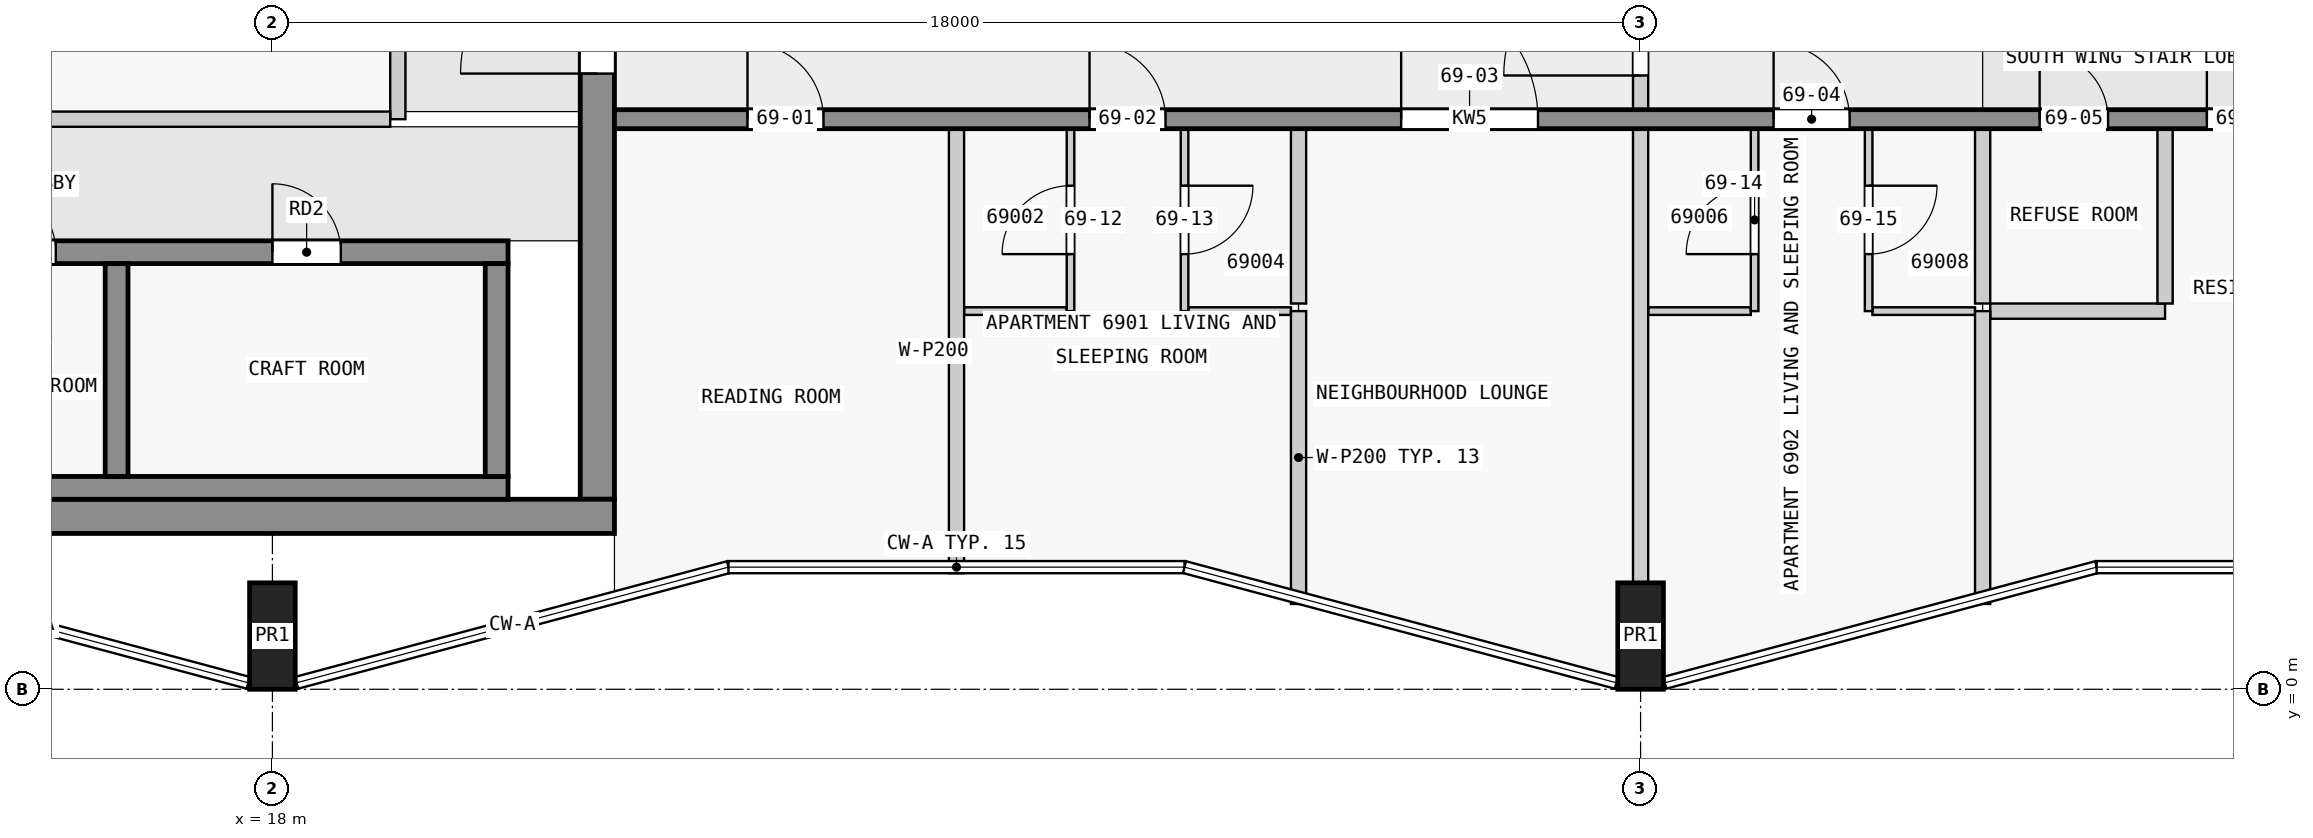
"""IFC4 building model, lengths in metres.
Left out: names, types, materials, properties, quantities, classifications, styles, units other than length and angle.
Written with IfcOpenShell. Run it as: python <this file> out.ifc"""

import sys

from ifc_helpers import new_model, si_unit, direction, frame, frame_2d, origin, origin_2d, place, context, subcontext, project, spatial, rectangle, extrude, element, fill, save


model = new_model("IFC4")
c1 = context("Model", 3, precision=1e-05, world=origin(), true_north=direction((0.0, 1.0)))
c2 = subcontext(c1, "Body", "Model", "MODEL_VIEW")
j1 = project(units=[si_unit("LENGTHUNIT", "METRE"), si_unit("PLANEANGLEUNIT", "RADIAN")], contexts=[c1])
p1 = place(None, origin())
s1 = spatial("IfcSite", under=j1, at=p1, CompositionType="ELEMENT")
p2 = place(p1, origin())
s2 = spatial("IfcBuilding", under=s1, at=p2, CompositionType="ELEMENT")
p3 = place(p2, frame((0.0, 0.0, 263.4)))
s3 = spatial("IfcBuildingStorey", under=s2, at=p3, CompositionType="ELEMENT", Elevation=263.4)
for number, where, z_axis, x_axis in (
    (1, (18.0, 0.7, 0.0), (0.0, 0.0, 1.0), (1.0, 0.0, 0.0)),
    (2, (36.0, 0.7, 0.0), (0.0, 0.0, 1.0), (1.0, 0.0, 0.0)),
):
    element("IfcColumn", number, at=place(p3, frame(where, z_axis=z_axis, x_axis=x_axis)), inside=s3, PredefinedType="COLUMN", context=c2, shape_type="SweptSolid", body=[
        extrude(rectangle(XDim=0.6, YDim=1.4, at=origin_2d()), origin(), (0.0, 0.0, 1.0), 3.5),
    ])
p4 = place(p3, frame((1.85, 2.275, 0.0), z_axis=(0.0, 0.0, 1.0), x_axis=(1.0, 0.0, 0.0)))
e3 = element("IfcWall", 3, at=p4, inside=s3, PredefinedType="SHEAR", context=c2, shape_type="SweptSolid", body=[
    extrude(rectangle(XDim=20.65, YDim=0.45, at=frame_2d((10.325, 0.0))), origin(), (0.0, 0.0, 1.0), 3.25),
])
p5 = place(p3, frame((22.275, 2.5, 0.0), z_axis=(0.0, 0.0, 1.0), x_axis=(0.0, 1.0, 0.0)))
e4 = element("IfcWall", 4, at=p5, inside=s3, PredefinedType="SHEAR", context=c2, shape_type="SweptSolid", body=[
    extrude(rectangle(XDim=15.05, YDim=0.45, at=frame_2d((7.525, 0.0))), origin(), (0.0, 0.0, 1.0), 3.25),
])
p6 = place(p5, frame((5.6, 0.0, 0.0)))
e5 = element("IfcOpeningElement", 5, at=p6, cuts=e4, PredefinedType="OPENING", context=c2, shape_type="SweptSolid", body=[
    extrude(rectangle(XDim=1.8, YDim=2.1, at=frame_2d((0.9, 1.05))), frame((0.0, 0.235, 0.0), z_axis=(0.0, -1.0, 0.0), x_axis=(1.0, 0.0, 0.0)), (0.0, 0.0, 1.0), 0.47),
])
p7 = place(p3, frame((13.3, 2.65, 0.0), z_axis=(0.0, 0.0, 1.0), x_axis=(1.0, 0.0, 0.0)))
e6 = element("IfcWall", 6, at=p7, inside=s3, PredefinedType="SHEAR", context=c2, shape_type="SweptSolid", body=[
    extrude(rectangle(XDim=7.8, YDim=0.3, at=frame_2d((3.9, 0.0))), origin(), (0.0, 0.0, 1.0), 3.25),
])
for number, where, z_axis, x_axis in (
    (7, (15.95, 2.8, 0.0), (0.0, 0.0, 1.0), (0.0, 1.0, 0.0)),
    (8, (20.95, 2.8, 0.0), (0.0, 0.0, 1.0), (0.0, 1.0, 0.0)),
):
    element("IfcWall", number, at=place(p3, frame(where, z_axis=z_axis, x_axis=x_axis)), inside=s3, PredefinedType="SHEAR", context=c2, shape_type="SweptSolid", body=[
        extrude(rectangle(XDim=2.8, YDim=0.3, at=frame_2d((1.4, 0.0))), origin(), (0.0, 0.0, 1.0), 3.25),
    ])
p8 = place(p3, frame((2.3, 5.75, 0.0), z_axis=(0.0, 0.0, 1.0), x_axis=(1.0, 0.0, 0.0)))
e9 = element("IfcWall", 9, at=p8, inside=s3, PredefinedType="SHEAR", context=c2, shape_type="SweptSolid", body=[
    extrude(rectangle(XDim=18.8, YDim=0.3, at=frame_2d((9.4, 0.0))), origin(), (0.0, 0.0, 1.0), 3.25),
])
p9 = place(p8, frame((4.65, 0.0, 0.0)))
e10 = element("IfcOpeningElement", 10, at=p9, cuts=e9, PredefinedType="OPENING", context=c2, shape_type="SweptSolid", body=[
    extrude(rectangle(XDim=1.1, YDim=2.1, at=frame_2d((0.55, 1.05))), frame((0.0, 0.16, 0.0), z_axis=(0.0, -1.0, 0.0), x_axis=(1.0, 0.0, 0.0)), (0.0, 0.0, 1.0), 0.32),
])
p10 = place(p8, frame((0.45, 0.0, 0.0)))
e11 = element("IfcOpeningElement", 11, at=p10, cuts=e9, PredefinedType="OPENING", context=c2, shape_type="SweptSolid", body=[
    extrude(rectangle(XDim=1.1, YDim=2.1, at=frame_2d((0.55, 1.05))), frame((0.0, 0.16, 0.0), z_axis=(0.0, -1.0, 0.0), x_axis=(1.0, 0.0, 0.0)), (0.0, 0.0, 1.0), 0.32),
])
p11 = place(p8, frame((2.75, 0.0, 0.0)))
e12 = element("IfcOpeningElement", 12, at=p11, cuts=e9, PredefinedType="OPENING", context=c2, shape_type="SweptSolid", body=[
    extrude(rectangle(XDim=1.1, YDim=2.1, at=frame_2d((0.55, 1.05))), frame((0.0, 0.16, 0.0), z_axis=(0.0, -1.0, 0.0), x_axis=(1.0, 0.0, 0.0)), (0.0, 0.0, 1.0), 0.32),
])
p12 = place(p8, frame((11.95, 0.0, 0.0)))
e13 = element("IfcOpeningElement", 13, at=p12, cuts=e9, PredefinedType="OPENING", context=c2, shape_type="SweptSolid", body=[
    extrude(rectangle(XDim=0.9, YDim=2.1, at=frame_2d((0.45, 1.05))), frame((0.0, 0.16, 0.0), z_axis=(0.0, -1.0, 0.0), x_axis=(1.0, 0.0, 0.0)), (0.0, 0.0, 1.0), 0.32),
])
p13 = place(p8, frame((15.7, 0.0, 0.0)))
e14 = element("IfcOpeningElement", 14, at=p13, cuts=e9, PredefinedType="OPENING", context=c2, shape_type="SweptSolid", body=[
    extrude(rectangle(XDim=0.9, YDim=2.1, at=frame_2d((0.45, 1.05))), frame((0.0, 0.16, 0.0), z_axis=(0.0, -1.0, 0.0), x_axis=(1.0, 0.0, 0.0)), (0.0, 0.0, 1.0), 0.32),
])
p14 = place(p3, frame((22.5, 7.5, 0.0), z_axis=(0.0, 0.0, 1.0), x_axis=(1.0, 0.0, 0.0)))
e15 = element("IfcWall", 15, at=p14, inside=s3, PredefinedType="SHEAR", context=c2, shape_type="SweptSolid", body=[
    extrude(rectangle(XDim=22.5, YDim=0.25, at=frame_2d((11.25, 0.0))), origin(), (0.0, 0.0, 1.0), 3.25),
])
p15 = place(p14, frame((1.75, 0.0, 0.0)))
e16 = element("IfcOpeningElement", 16, at=p15, cuts=e15, PredefinedType="OPENING", context=c2, shape_type="SweptSolid", body=[
    extrude(rectangle(XDim=1.0, YDim=2.1, at=frame_2d((0.5, 1.05))), frame((0.0, 0.135, 0.0), z_axis=(0.0, -1.0, 0.0), x_axis=(1.0, 0.0, 0.0)), (0.0, 0.0, 1.0), 0.27),
])
p16 = place(p14, frame((6.25, 0.0, 0.0)))
e17 = element("IfcOpeningElement", 17, at=p16, cuts=e15, PredefinedType="OPENING", context=c2, shape_type="SweptSolid", body=[
    extrude(rectangle(XDim=1.0, YDim=2.1, at=frame_2d((0.5, 1.05))), frame((0.0, 0.135, 0.0), z_axis=(0.0, -1.0, 0.0), x_axis=(1.0, 0.0, 0.0)), (0.0, 0.0, 1.0), 0.27),
])
p17 = place(p14, frame((10.35, 0.0, 0.0)))
e18 = element("IfcOpeningElement", 18, at=p17, cuts=e15, PredefinedType="OPENING", context=c2, shape_type="SweptSolid", body=[
    extrude(rectangle(XDim=1.8, YDim=2.1, at=frame_2d((0.9, 1.05))), frame((0.0, 0.135, 0.0), z_axis=(0.0, -1.0, 0.0), x_axis=(1.0, 0.0, 0.0)), (0.0, 0.0, 1.0), 0.27),
])
p18 = place(p14, frame((15.25, 0.0, 0.0)))
e19 = element("IfcOpeningElement", 19, at=p18, cuts=e15, PredefinedType="OPENING", context=c2, shape_type="SweptSolid", body=[
    extrude(rectangle(XDim=1.0, YDim=2.1, at=frame_2d((0.5, 1.05))), frame((0.0, 0.135, 0.0), z_axis=(0.0, -1.0, 0.0), x_axis=(1.0, 0.0, 0.0)), (0.0, 0.0, 1.0), 0.27),
])
p19 = place(p14, frame((18.75, 0.0, 0.0)))
e20 = element("IfcOpeningElement", 20, at=p19, cuts=e15, PredefinedType="OPENING", context=c2, shape_type="SweptSolid", body=[
    extrude(rectangle(XDim=0.9, YDim=2.1, at=frame_2d((0.45, 1.05))), frame((0.0, 0.135, 0.0), z_axis=(0.0, -1.0, 0.0), x_axis=(1.0, 0.0, 0.0)), (0.0, 0.0, 1.0), 0.27),
])
p20 = place(p14, frame((20.95, 0.0, 0.0)))
e21 = element("IfcOpeningElement", 21, at=p20, cuts=e15, PredefinedType="OPENING", context=c2, shape_type="SweptSolid", body=[
    extrude(rectangle(XDim=1.0, YDim=2.1, at=frame_2d((0.5, 1.05))), frame((0.0, 0.135, 0.0), z_axis=(0.0, -1.0, 0.0), x_axis=(1.0, 0.0, 0.0)), (0.0, 0.0, 1.0), 0.27),
])
p21 = place(p3, frame((10.9, 7.5, 0.0), z_axis=(0.0, 0.0, 1.0), x_axis=(1.0, 0.0, 0.0)))
e22 = element("IfcWall", 22, at=p21, inside=s3, PredefinedType="PARTITIONING", context=c2, shape_type="SweptSolid", body=[
    extrude(rectangle(XDim=8.65, YDim=0.2, at=frame_2d((4.325, 0.0))), origin(), (0.0, 0.0, 1.0), 3.25),
])
p22 = place(p3, frame((19.65, 7.5, 0.0), z_axis=(0.0, 0.0, 1.0), x_axis=(0.0, 1.0, 0.0)))
e23 = element("IfcWall", 23, at=p22, inside=s3, PredefinedType="PARTITIONING", context=c2, shape_type="SweptSolid", body=[
    extrude(rectangle(XDim=4.7, YDim=0.2, at=frame_2d((2.35, 0.0))), origin(), (0.0, 0.0, 1.0), 3.25),
])
for number, where, z_axis, x_axis in (
    (24, (27.1, 4.975, 0.0), (0.0, 0.0, 1.0), (1.0, 0.0, 0.0)),
    (25, (30.05, 4.975, 0.0), (0.0, 0.0, 1.0), (1.0, 0.0, 0.0)),
    (26, (36.1, 4.975, 0.0), (0.0, 0.0, 1.0), (1.0, 0.0, 0.0)),
    (27, (39.05, 4.975, 0.0), (0.0, 0.0, 1.0), (1.0, 0.0, 0.0)),
):
    element("IfcWall", number, at=place(p3, frame(where, z_axis=z_axis, x_axis=x_axis)), inside=s3, PredefinedType="PARTITIONING", context=c2, shape_type="SweptSolid", body=[
        extrude(rectangle(XDim=1.35, YDim=0.1, at=frame_2d((0.675, 0.0))), origin(), (0.0, 0.0, 1.0), 3.25),
    ])
p23 = place(p3, frame((40.6, 4.975, 0.0), z_axis=(0.0, 0.0, 1.0), x_axis=(1.0, 0.0, 0.0)))
e28 = element("IfcWall", 28, at=p23, inside=s3, PredefinedType="PARTITIONING", context=c2, shape_type="SweptSolid", body=[
    extrude(rectangle(XDim=2.3, YDim=0.2, at=frame_2d((1.15, 0.0))), origin(), (0.0, 0.0, 1.0), 3.25),
])
p24 = place(p3, frame((27.0, 1.527, 0.0), z_axis=(0.0, 0.0, 1.0), x_axis=(0.0, 1.0, 0.0)))
e29 = element("IfcWall", 29, at=p24, inside=s3, PredefinedType="PARTITIONING", context=c2, shape_type="SweptSolid", body=[
    extrude(rectangle(XDim=5.848, YDim=0.2, at=frame_2d((2.924, 0.0))), origin(), (0.0, 0.0, 1.0), 3.25),
])
p25 = place(p3, frame((28.5, 4.975, 0.0), z_axis=(0.0, 0.0, 1.0), x_axis=(0.0, 1.0, 0.0)))
e30 = element("IfcWall", 30, at=p25, inside=s3, PredefinedType="PARTITIONING", context=c2, shape_type="SweptSolid", body=[
    extrude(rectangle(XDim=2.4, YDim=0.1, at=frame_2d((1.2, 0.0))), origin(), (0.0, 0.0, 1.0), 3.25),
])
p26 = place(p25, frame((0.75, 0.0, 0.0)))
e31 = element("IfcOpeningElement", 31, at=p26, cuts=e30, PredefinedType="OPENING", context=c2, shape_type="SweptSolid", body=[
    extrude(rectangle(XDim=0.9, YDim=2.1, at=frame_2d((0.45, 1.05))), frame((0.0, 0.06, 0.0), z_axis=(0.0, -1.0, 0.0), x_axis=(1.0, 0.0, 0.0)), (0.0, 0.0, 1.0), 0.12),
])
p27 = place(p3, frame((30.0, 7.375, 0.0), z_axis=(0.0, 0.0, 1.0), x_axis=(0.0, -1.0, 0.0)))
e32 = element("IfcWall", 32, at=p27, inside=s3, PredefinedType="PARTITIONING", context=c2, shape_type="SweptSolid", body=[
    extrude(rectangle(XDim=2.4, YDim=0.1, at=frame_2d((1.2, 0.0))), origin(), (0.0, 0.0, 1.0), 3.25),
])
p28 = place(p27, frame((0.75, 0.0, 0.0)))
e33 = element("IfcOpeningElement", 33, at=p28, cuts=e32, PredefinedType="OPENING", context=c2, shape_type="SweptSolid", body=[
    extrude(rectangle(XDim=0.9, YDim=2.1, at=frame_2d((0.45, 1.05))), frame((0.0, 0.06, 0.0), z_axis=(0.0, -1.0, 0.0), x_axis=(1.0, 0.0, 0.0)), (0.0, 0.0, 1.0), 0.12),
])
p29 = place(p3, frame((31.5, 4.975, 0.0), z_axis=(0.0, 0.0, 1.0), x_axis=(0.0, -1.0, 0.0)))
e34 = element("IfcWall", 34, at=p29, inside=s3, PredefinedType="PARTITIONING", context=c2, shape_type="SweptSolid", body=[
    extrude(rectangle(XDim=3.853, YDim=0.2, at=frame_2d((1.926, 0.0))), origin(), (0.0, 0.0, 1.0), 3.25),
])
p30 = place(p3, frame((31.5, 5.075, 0.0), z_axis=(0.0, 0.0, 1.0), x_axis=(0.0, 1.0, 0.0)))
e35 = element("IfcWall", 35, at=p30, inside=s3, PredefinedType="PARTITIONING", context=c2, shape_type="SweptSolid", body=[
    extrude(rectangle(XDim=2.3, YDim=0.2, at=frame_2d((1.15, 0.0))), origin(), (0.0, 0.0, 1.0), 3.25),
])
p31 = place(p3, frame((36.0, 1.4, 0.0), z_axis=(0.0, 0.0, 1.0), x_axis=(0.0, 1.0, 0.0)))
e36 = element("IfcWall", 36, at=p31, inside=s3, PredefinedType="PARTITIONING", context=c2, shape_type="SweptSolid", body=[
    extrude(rectangle(XDim=5.975, YDim=0.2, at=frame_2d((2.988, 0.0))), origin(), (0.0, 0.0, 1.0), 3.25),
])
p32 = place(p3, frame((37.5, 4.975, 0.0), z_axis=(0.0, 0.0, 1.0), x_axis=(0.0, 1.0, 0.0)))
e37 = element("IfcWall", 37, at=p32, inside=s3, PredefinedType="PARTITIONING", context=c2, shape_type="SweptSolid", body=[
    extrude(rectangle(XDim=2.4, YDim=0.1, at=frame_2d((1.2, 0.0))), origin(), (0.0, 0.0, 1.0), 3.25),
])
p33 = place(p32, frame((0.75, 0.0, 0.0)))
e38 = element("IfcOpeningElement", 38, at=p33, cuts=e37, PredefinedType="OPENING", context=c2, shape_type="SweptSolid", body=[
    extrude(rectangle(XDim=0.9, YDim=2.1, at=frame_2d((0.45, 1.05))), frame((0.0, 0.06, 0.0), z_axis=(0.0, -1.0, 0.0), x_axis=(1.0, 0.0, 0.0)), (0.0, 0.0, 1.0), 0.12),
])
p34 = place(p3, frame((39.0, 7.375, 0.0), z_axis=(0.0, 0.0, 1.0), x_axis=(0.0, -1.0, 0.0)))
e39 = element("IfcWall", 39, at=p34, inside=s3, PredefinedType="PARTITIONING", context=c2, shape_type="SweptSolid", body=[
    extrude(rectangle(XDim=2.4, YDim=0.1, at=frame_2d((1.2, 0.0))), origin(), (0.0, 0.0, 1.0), 3.25),
])
p35 = place(p34, frame((0.75, 0.0, 0.0)))
e40 = element("IfcOpeningElement", 40, at=p35, cuts=e39, PredefinedType="OPENING", context=c2, shape_type="SweptSolid", body=[
    extrude(rectangle(XDim=0.9, YDim=2.1, at=frame_2d((0.45, 1.05))), frame((0.0, 0.06, 0.0), z_axis=(0.0, -1.0, 0.0), x_axis=(1.0, 0.0, 0.0)), (0.0, 0.0, 1.0), 0.12),
])
p36 = place(p3, frame((40.5, 4.975, 0.0), z_axis=(0.0, 0.0, 1.0), x_axis=(0.0, -1.0, 0.0)))
e41 = element("IfcWall", 41, at=p36, inside=s3, PredefinedType="PARTITIONING", context=c2, shape_type="SweptSolid", body=[
    extrude(rectangle(XDim=3.853, YDim=0.2, at=frame_2d((1.926, 0.0))), origin(), (0.0, 0.0, 1.0), 3.25),
])
for number, where, z_axis, x_axis in (
    (42, (40.5, 5.075, 0.0), (0.0, 0.0, 1.0), (0.0, 1.0, 0.0)),
    (43, (42.9, 5.075, 0.0), (0.0, 0.0, 1.0), (0.0, 1.0, 0.0)),
):
    element("IfcWall", number, at=place(p3, frame(where, z_axis=z_axis, x_axis=x_axis)), inside=s3, PredefinedType="PARTITIONING", context=c2, shape_type="SweptSolid", body=[
        extrude(rectangle(XDim=2.3, YDim=0.2, at=frame_2d((1.15, 0.0))), origin(), (0.0, 0.0, 1.0), 3.25),
    ])
p37 = place(p3, frame((36.0, 7.475, 0.0), z_axis=(0.0, 0.0, 1.0), x_axis=(0.0, 1.0, 0.0)))
e44 = element("IfcWall", 44, at=p37, inside=s3, PredefinedType="PARTITIONING", context=c2, shape_type="SweptSolid", body=[
    extrude(rectangle(XDim=3.05, YDim=0.2, at=frame_2d((1.525, 0.0))), origin(), (0.0, 0.0, 1.0), 3.25),
])
p38 = place(p37, frame((0.6, 0.0, 0.0)))
e45 = element("IfcOpeningElement", 45, at=p38, cuts=e44, PredefinedType="OPENING", context=c2, shape_type="SweptSolid", body=[
    extrude(rectangle(XDim=1.8, YDim=2.1, at=frame_2d((0.9, 1.05))), frame((0.0, 0.11, 0.0), z_axis=(0.0, -1.0, 0.0), x_axis=(1.0, 0.0, 0.0)), (0.0, 0.0, 1.0), 0.22),
])
p39 = place(p6, origin())
e46 = element("IfcDoor", 46, at=p39, inside=s3, OperationType="DOUBLE_DOOR_SINGLE_SWING", PredefinedType="DOOR", context=c2, shape_type="SweptSolid", body=[
    extrude(rectangle(XDim=1.8, YDim=2.1, at=frame_2d((0.9, 1.05))), frame((0.0, 0.025, 0.0), z_axis=(0.0, -1.0, 0.0), x_axis=(1.0, 0.0, 0.0)), (0.0, 0.0, 1.0), 0.05),
])
fill(e5, e46)
p40 = place(p12, origin())
e47 = element("IfcDoor", 47, at=p40, inside=s3, OperationType="SINGLE_SWING_LEFT", PredefinedType="DOOR", context=c2, shape_type="SweptSolid", body=[
    extrude(rectangle(XDim=0.9, YDim=2.1, at=frame_2d((0.45, 1.05))), frame((0.0, 0.025, 0.0), z_axis=(0.0, -1.0, 0.0), x_axis=(1.0, 0.0, 0.0)), (0.0, 0.0, 1.0), 0.05),
])
fill(e13, e47)
p41 = place(p13, origin())
e48 = element("IfcDoor", 48, at=p41, inside=s3, OperationType="SINGLE_SWING_LEFT", PredefinedType="DOOR", context=c2, shape_type="SweptSolid", body=[
    extrude(rectangle(XDim=0.9, YDim=2.1, at=frame_2d((0.45, 1.05))), frame((0.0, 0.025, 0.0), z_axis=(0.0, -1.0, 0.0), x_axis=(1.0, 0.0, 0.0)), (0.0, 0.0, 1.0), 0.05),
])
fill(e14, e48)
p42 = place(p15, origin())
e49 = element("IfcDoor", 49, at=p42, inside=s3, OperationType="SINGLE_SWING_LEFT", PredefinedType="DOOR", context=c2, shape_type="SweptSolid", body=[
    extrude(rectangle(XDim=1.0, YDim=2.1, at=frame_2d((0.5, 1.05))), frame((0.0, 0.025, 0.0), z_axis=(0.0, -1.0, 0.0), x_axis=(1.0, 0.0, 0.0)), (0.0, 0.0, 1.0), 0.05),
])
fill(e16, e49)
p43 = place(p16, origin())
e50 = element("IfcDoor", 50, at=p43, inside=s3, OperationType="SINGLE_SWING_LEFT", PredefinedType="DOOR", context=c2, shape_type="SweptSolid", body=[
    extrude(rectangle(XDim=1.0, YDim=2.1, at=frame_2d((0.5, 1.05))), frame((0.0, 0.025, 0.0), z_axis=(0.0, -1.0, 0.0), x_axis=(1.0, 0.0, 0.0)), (0.0, 0.0, 1.0), 0.05),
])
fill(e17, e50)
p44 = place(p17, origin())
e51 = element("IfcDoor", 51, at=p44, inside=s3, OperationType="SINGLE_SWING_LEFT", PredefinedType="DOOR", context=c2, shape_type="SweptSolid", body=[
    extrude(rectangle(XDim=1.8, YDim=2.1, at=frame_2d((0.9, 1.05))), frame((0.0, 0.025, 0.0), z_axis=(0.0, -1.0, 0.0), x_axis=(1.0, 0.0, 0.0)), (0.0, 0.0, 1.0), 0.05),
])
fill(e18, e51)
p45 = place(p18, origin())
e52 = element("IfcDoor", 52, at=p45, inside=s3, OperationType="SINGLE_SWING_RIGHT", PredefinedType="DOOR", context=c2, shape_type="SweptSolid", body=[
    extrude(rectangle(XDim=1.0, YDim=2.1, at=frame_2d((0.5, 1.05))), frame((0.0, 0.025, 0.0), z_axis=(0.0, -1.0, 0.0), x_axis=(1.0, 0.0, 0.0)), (0.0, 0.0, 1.0), 0.05),
])
fill(e19, e52)
p46 = place(p19, origin())
e53 = element("IfcDoor", 53, at=p46, inside=s3, OperationType="SINGLE_SWING_RIGHT", PredefinedType="DOOR", context=c2, shape_type="SweptSolid", body=[
    extrude(rectangle(XDim=0.9, YDim=2.1, at=frame_2d((0.45, 1.05))), frame((0.0, 0.025, 0.0), z_axis=(0.0, -1.0, 0.0), x_axis=(1.0, 0.0, 0.0)), (0.0, 0.0, 1.0), 0.05),
])
fill(e20, e53)
p47 = place(p20, origin())
e54 = element("IfcDoor", 54, at=p47, inside=s3, OperationType="SINGLE_SWING_RIGHT", PredefinedType="DOOR", context=c2, shape_type="SweptSolid", body=[
    extrude(rectangle(XDim=1.0, YDim=2.1, at=frame_2d((0.5, 1.05))), frame((0.0, 0.025, 0.0), z_axis=(0.0, -1.0, 0.0), x_axis=(1.0, 0.0, 0.0)), (0.0, 0.0, 1.0), 0.05),
])
fill(e21, e54)
p48 = place(p38, origin())
e55 = element("IfcDoor", 55, at=p48, inside=s3, OperationType="SINGLE_SWING_LEFT", PredefinedType="DOOR", context=c2, shape_type="SweptSolid", body=[
    extrude(rectangle(XDim=1.8, YDim=2.1, at=frame_2d((0.9, 1.05))), frame((0.0, 0.025, 0.0), z_axis=(0.0, -1.0, 0.0), x_axis=(1.0, 0.0, 0.0)), (0.0, 0.0, 1.0), 0.05),
])
fill(e45, e55)
p49 = place(p26, origin())
e56 = element("IfcDoor", 56, at=p49, inside=s3, OperationType="SINGLE_SWING_LEFT", PredefinedType="DOOR", context=c2, shape_type="SweptSolid", body=[
    extrude(rectangle(XDim=0.9, YDim=2.1, at=frame_2d((0.45, 1.05))), frame((0.0, 0.025, 0.0), z_axis=(0.0, -1.0, 0.0), x_axis=(1.0, 0.0, 0.0)), (0.0, 0.0, 1.0), 0.05),
])
fill(e31, e56)
p50 = place(p28, origin())
e57 = element("IfcDoor", 57, at=p50, inside=s3, OperationType="SINGLE_SWING_LEFT", PredefinedType="DOOR", context=c2, shape_type="SweptSolid", body=[
    extrude(rectangle(XDim=0.9, YDim=2.1, at=frame_2d((0.45, 1.05))), frame((0.0, 0.025, 0.0), z_axis=(0.0, -1.0, 0.0), x_axis=(1.0, 0.0, 0.0)), (0.0, 0.0, 1.0), 0.05),
])
fill(e33, e57)
p51 = place(p33, origin())
e58 = element("IfcDoor", 58, at=p51, inside=s3, OperationType="SINGLE_SWING_LEFT", PredefinedType="DOOR", context=c2, shape_type="SweptSolid", body=[
    extrude(rectangle(XDim=0.9, YDim=2.1, at=frame_2d((0.45, 1.05))), frame((0.0, 0.025, 0.0), z_axis=(0.0, -1.0, 0.0), x_axis=(1.0, 0.0, 0.0)), (0.0, 0.0, 1.0), 0.05),
])
fill(e38, e58)
p52 = place(p35, origin())
e59 = element("IfcDoor", 59, at=p52, inside=s3, OperationType="SINGLE_SWING_LEFT", PredefinedType="DOOR", context=c2, shape_type="SweptSolid", body=[
    extrude(rectangle(XDim=0.9, YDim=2.1, at=frame_2d((0.45, 1.05))), frame((0.0, 0.025, 0.0), z_axis=(0.0, -1.0, 0.0), x_axis=(1.0, 0.0, 0.0)), (0.0, 0.0, 1.0), 0.05),
])
fill(e40, e59)
save(model, sys.argv[1])
